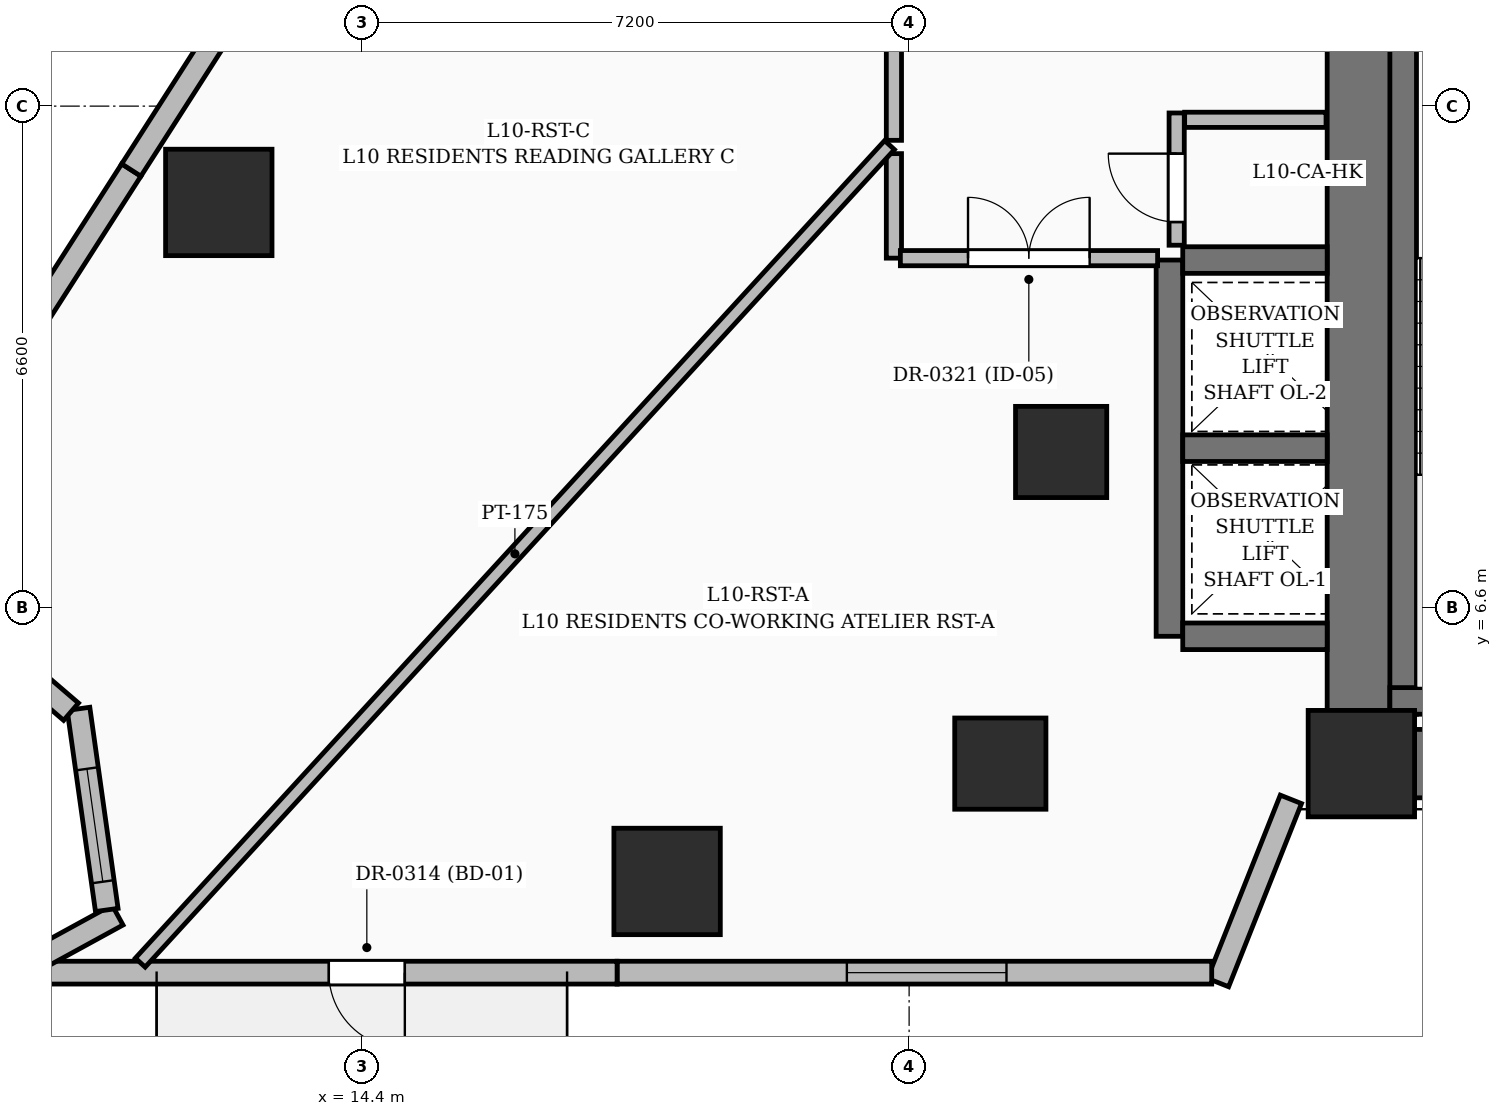
"""IFC4 building model, lengths in metres.
Left out: names, types, materials, properties, quantities, classifications, styles, units other than length and angle.
Written with IfcOpenShell. Run it as: python <this file> out.ifc"""

import sys

from ifc_helpers import new_model, si_unit, direction, frame, frame_2d, origin, origin_2d, place, context, subcontext, project, spatial, rectangle, extrude, element, fill, save


model = new_model("IFC4")
c1 = context("Model", 3, precision=1e-05, world=origin(), true_north=direction((0.0, 1.0)))
c2 = subcontext(c1, "Body", "Model", "MODEL_VIEW")
j1 = project(units=[si_unit("LENGTHUNIT", "METRE"), si_unit("PLANEANGLEUNIT", "RADIAN")], contexts=[c1])
p1 = place(None, origin())
s1 = spatial("IfcSite", under=j1, at=p1, CompositionType="ELEMENT")
p2 = place(p1, origin())
s2 = spatial("IfcBuilding", under=s1, at=p2, CompositionType="ELEMENT")
p3 = place(p2, frame((0.0, 0.0, 46.2)))
s3 = spatial("IfcBuildingStorey", under=s2, at=p3, CompositionType="ELEMENT", Elevation=46.2)
p4 = place(p3, frame((27.55, 4.55, 0.0), z_axis=(0.0, 0.0, 1.0), x_axis=(1.0, 0.0, 0.0)))
e1 = element("IfcColumn", 1, at=p4, inside=s3, PredefinedType="COLUMN", context=c2, shape_type="SweptSolid", body=[
    extrude(rectangle(XDim=1.4, YDim=1.4, at=origin_2d()), origin(), (0.0, 0.0, 1.0), 3.6),
])
for number, where, z_axis, x_axis in (
    (2, (22.8, 4.55, 0.0), (0.0, 0.0, 1.0), (1.0, 0.0, 0.0)),
    (3, (23.6, 8.65, 0.0), (0.0, 0.0, 1.0), (1.0, 0.0, 0.0)),
):
    element("IfcColumn", number, at=place(p3, frame(where, z_axis=z_axis, x_axis=x_axis)), inside=s3, PredefinedType="COLUMN", context=c2, shape_type="SweptSolid", body=[
        extrude(rectangle(XDim=1.2, YDim=1.2, at=origin_2d()), origin(), (0.0, 0.0, 1.0), 3.6),
    ])
p5 = place(p3, frame((28.25, 4.55, 0.0), z_axis=(0.0, 0.0, 1.0), x_axis=(1.0, 0.0, 0.0)))
e4 = element("IfcWall", 4, at=p5, inside=s3, PredefinedType="SHEAR", context=c2, shape_type="SweptSolid", body=[
    extrude(rectangle(XDim=6.2, YDim=0.9, at=frame_2d((3.1, 0.0))), origin(), (0.0, 0.0, 1.0), 3.6),
])
p6 = place(p3, frame((27.55, 5.25, 0.0), z_axis=(0.0, 0.0, 1.0), x_axis=(0.0, 1.0, 0.0)))
e5 = element("IfcWall", 5, at=p6, inside=s3, PredefinedType="SHEAR", context=c2, shape_type="SweptSolid", body=[
    extrude(rectangle(XDim=8.8, YDim=0.9, at=frame_2d((4.4, 0.0))), origin(), (0.0, 0.0, 1.0), 3.6),
])
p7 = place(p3, frame((28.1, 5.2, 0.0), z_axis=(0.0, 0.0, 1.0), x_axis=(0.0, 1.0, 0.0)))
e6 = element("IfcWall", 6, at=p7, inside=s3, PredefinedType="SOLIDWALL", context=c2, shape_type="SweptSolid", body=[
    extrude(rectangle(XDim=9.1, YDim=0.35, at=frame_2d((4.55, 0.0))), origin(), (0.0, 0.0, 1.0), 3.6),
])
p8 = place(p3, frame((27.925, 5.375, 0.0), z_axis=(0.0, 0.0, 1.0), x_axis=(1.0, 0.0, 0.0)))
e7 = element("IfcWall", 7, at=p8, inside=s3, PredefinedType="SOLIDWALL", context=c2, shape_type="SweptSolid", body=[
    extrude(rectangle(XDim=3.55, YDim=0.35, at=frame_2d((1.775, 0.0))), origin(), (0.0, 0.0, 1.0), 3.6),
])
p9 = place(p3, frame((25.025, 6.225, 0.0), z_axis=(0.0, 0.0, 1.0), x_axis=(0.0, 1.0, 0.0)))
e8 = element("IfcWall", 8, at=p9, inside=s3, PredefinedType="SOLIDWALL", context=c2, shape_type="SweptSolid", body=[
    extrude(rectangle(XDim=4.95, YDim=0.35, at=frame_2d((2.475, 0.0))), origin(), (0.0, 0.0, 1.0), 3.6),
])
for number, where, z_axis, x_axis in (
    (9, (25.2, 6.225, 0.0), (0.0, 0.0, 1.0), (1.0, 0.0, 0.0)),
    (10, (25.2, 8.7, 0.0), (0.0, 0.0, 1.0), (1.0, 0.0, 0.0)),
    (11, (25.2, 11.175, 0.0), (0.0, 0.0, 1.0), (1.0, 0.0, 0.0)),
):
    element("IfcWall", number, at=place(p3, frame(where, z_axis=z_axis, x_axis=x_axis)), inside=s3, PredefinedType="SOLIDWALL", context=c2, shape_type="SweptSolid", body=[
        extrude(rectangle(XDim=1.9, YDim=0.35, at=frame_2d((0.95, 0.0))), origin(), (0.0, 0.0, 1.0), 3.6),
    ])
for number, where, z_axis, x_axis in (
    (12, (18.416, 3.0, 0.0), (0.0, 0.0, 1.0), (1.0, 0.0, 0.0)),
    (13, (12.518, 11.933, 0.0), (0.0, 0.0, 1.0), (1.0, 0.0, 0.0)),
):
    element("IfcColumn", number, at=place(p3, frame(where, z_axis=z_axis, x_axis=x_axis)), inside=s3, PredefinedType="COLUMN", context=c2, shape_type="SweptSolid", body=[
        extrude(rectangle(XDim=1.4, YDim=1.4, at=origin_2d()), origin(), (0.0, 0.0, 1.0), 3.6),
    ])
p10 = place(p3, frame((26.623, 4.08, 0.0), z_axis=(0.0, 0.0, 1.0), x_axis=(-0.369539870332, -0.929214875169, 0.0)))
e14 = element("IfcWall", 14, at=p10, inside=s3, PredefinedType="SOLIDWALL", context=c2, shape_type="SweptSolid", body=[
    extrude(rectangle(XDim=2.594, YDim=0.3, at=frame_2d((1.297, 0.0))), origin(), (0.0, 0.0, 1.0), 2.375),
])
p11 = place(p3, frame((25.581, 1.8, 0.0), z_axis=(0.0, 0.0, 1.0), x_axis=(-1.0, 0.0, 0.0)))
e15 = element("IfcWall", 15, at=p11, inside=s3, PredefinedType="SOLIDWALL", context=c2, shape_type="SweptSolid", body=[
    extrude(rectangle(XDim=7.823, YDim=0.3, at=frame_2d((3.912, 0.0))), origin(), (0.0, 0.0, 1.0), 3.35),
])
p12 = place(p11, frame((2.7, 0.0, 0.55)))
e16 = element("IfcOpeningElement", 16, at=p12, cuts=e15, PredefinedType="OPENING", context=c2, shape_type="SweptSolid", body=[
    extrude(rectangle(XDim=2.1, YDim=2.4, at=frame_2d((1.05, 1.2))), frame((0.0, 0.16, 0.0), z_axis=(0.0, -1.0, 0.0), x_axis=(1.0, 0.0, 0.0)), (0.0, 0.0, 1.0), 0.32),
])
p13 = place(p3, frame((17.758, 1.8, 0.0), z_axis=(0.0, 0.0, 1.0), x_axis=(-1.0, 0.0, 0.0)))
e17 = element("IfcWall", 17, at=p13, inside=s3, PredefinedType="SOLIDWALL", context=c2, shape_type="SweptSolid", body=[
    extrude(rectangle(XDim=8.098, YDim=0.3, at=frame_2d((4.049, 0.0))), origin(), (0.0, 0.0, 1.0), 3.35),
])
p14 = place(p13, frame((2.792, 0.0, 0.0)))
e18 = element("IfcOpeningElement", 18, at=p14, cuts=e17, PredefinedType="OPENING", context=c2, shape_type="SweptSolid", body=[
    extrude(rectangle(XDim=1.0, YDim=2.2, at=frame_2d((0.5, 1.1))), frame((0.0, 0.16, 0.0), z_axis=(0.0, -1.0, 0.0), x_axis=(1.0, 0.0, 0.0)), (0.0, 0.0, 1.0), 0.32),
])
p15 = place(p3, frame((10.221, 2.031, 0.0), z_axis=(0.0, 0.0, 1.0), x_axis=(0.877343386297, 0.479863087266, 0.0)))
e19 = element("IfcWall", 19, at=p15, inside=s3, PredefinedType="SOLIDWALL", context=c2, shape_type="SweptSolid", body=[
    extrude(rectangle(XDim=1.099, YDim=0.3, at=frame_2d((0.55, 0.0))), origin(), (0.0, 0.0, 1.0), 3.35),
])
p16 = place(p3, frame((11.044, 2.625, 0.0), z_axis=(0.0, 0.0, 1.0), x_axis=(-0.139079814349, 0.990281174839, 0.0)))
e20 = element("IfcWall", 20, at=p16, inside=s3, PredefinedType="SOLIDWALL", context=c2, shape_type="SweptSolid", body=[
    extrude(rectangle(XDim=2.672, YDim=0.3, at=frame_2d((1.336, 0.0))), origin(), (0.0, 0.0, 1.0), 3.35),
])
p17 = place(p16, frame((0.375, 0.0, 0.6)))
e21 = element("IfcOpeningElement", 21, at=p17, cuts=e20, PredefinedType="OPENING", context=c2, shape_type="SweptSolid", body=[
    extrude(rectangle(XDim=1.5, YDim=2.1, at=frame_2d((0.75, 1.05))), frame((0.0, 0.16, 0.0), z_axis=(0.0, -1.0, 0.0), x_axis=(1.0, 0.0, 0.0)), (0.0, 0.0, 1.0), 0.32),
])
p18 = place(p3, frame((10.574, 5.233, 0.0), z_axis=(0.0, 0.0, 1.0), x_axis=(-0.758703874518, 0.651435668958, 0.0)))
e22 = element("IfcWall", 22, at=p18, inside=s3, PredefinedType="SOLIDWALL", context=c2, shape_type="SweptSolid", body=[
    extrude(rectangle(XDim=2.652, YDim=0.3, at=frame_2d((1.326, 0.0))), origin(), (0.0, 0.0, 1.0), 3.35),
])
p19 = place(p18, frame((0.505, 0.0, 0.8)))
e23 = element("IfcOpeningElement", 23, at=p19, cuts=e22, PredefinedType="OPENING", context=c2, shape_type="SweptSolid", body=[
    extrude(rectangle(XDim=1.2, YDim=1.8, at=frame_2d((0.6, 0.9))), frame((0.0, 0.16, 0.0), z_axis=(0.0, -1.0, 0.0), x_axis=(1.0, 0.0, 0.0)), (0.0, 0.0, 1.0), 0.32),
])
p20 = place(p3, frame((7.66, 6.574, 0.0), z_axis=(0.0, 0.0, 1.0), x_axis=(0.539514369137, 0.84197639248, 0.0)))
e24 = element("IfcWall", 24, at=p20, inside=s3, PredefinedType="SOLIDWALL", context=c2, shape_type="SweptSolid", body=[
    extrude(rectangle(XDim=6.872, YDim=0.3, at=frame_2d((3.436, 0.0))), origin(), (0.0, 0.0, 1.0), 3.35),
])
p21 = place(p20, frame((2.615, 0.0, 0.55)))
e25 = element("IfcOpeningElement", 25, at=p21, cuts=e24, PredefinedType="OPENING", context=c2, shape_type="SweptSolid", body=[
    extrude(rectangle(XDim=2.1, YDim=2.4, at=frame_2d((1.05, 1.2))), frame((0.0, 0.16, 0.0), z_axis=(0.0, -1.0, 0.0), x_axis=(1.0, 0.0, 0.0)), (0.0, 0.0, 1.0), 0.32),
])
p22 = place(p3, frame((11.367, 12.359, 0.0), z_axis=(0.0, 0.0, 1.0), x_axis=(0.539548093607, 0.841954781853, 0.0)))
e26 = element("IfcWall", 26, at=p22, inside=s3, PredefinedType="SOLIDWALL", context=c2, shape_type="SweptSolid", body=[
    extrude(rectangle(XDim=7.481, YDim=0.3, at=frame_2d((3.741, 0.0))), origin(), (0.0, 0.0, 1.0), 3.35),
])
p23 = place(p22, frame((4.449, 0.0, 0.0)))
e27 = element("IfcOpeningElement", 27, at=p23, cuts=e26, PredefinedType="OPENING", context=c2, shape_type="SweptSolid", body=[
    extrude(rectangle(XDim=1.0, YDim=2.2, at=frame_2d((0.5, 1.1))), frame((0.0, 0.16, 0.0), z_axis=(0.0, -1.0, 0.0), x_axis=(1.0, 0.0, 0.0)), (0.0, 0.0, 1.0), 0.32),
])
p24 = place(p3, frame((25.12, 11.37, 0.0), z_axis=(0.0, 0.0, 1.0), x_axis=(0.0, 1.0, 0.0)))
e28 = element("IfcWall", 28, at=p24, inside=s3, PredefinedType="PARTITIONING", context=c2, shape_type="SweptSolid", body=[
    extrude(rectangle(XDim=1.74, YDim=0.2, at=frame_2d((0.87, 0.0))), origin(), (0.0, 0.0, 1.0), 3.35),
])
p25 = place(p24, frame((0.305, 0.0, 0.0)))
e29 = element("IfcOpeningElement", 29, at=p25, cuts=e28, PredefinedType="OPENING", context=c2, shape_type="SweptSolid", body=[
    extrude(rectangle(XDim=0.9, YDim=2.1, at=frame_2d((0.45, 1.05))), frame((0.0, 0.11, 0.0), z_axis=(0.0, -1.0, 0.0), x_axis=(1.0, 0.0, 0.0)), (0.0, 0.0, 1.0), 0.22),
])
p26 = place(p3, frame((25.225, 13.02, 0.0), z_axis=(0.0, 0.0, 1.0), x_axis=(1.0, 0.0, 0.0)))
e30 = element("IfcWall", 30, at=p26, inside=s3, PredefinedType="PARTITIONING", context=c2, shape_type="SweptSolid", body=[
    extrude(rectangle(XDim=1.86, YDim=0.2, at=frame_2d((0.93, 0.0))), origin(), (0.0, 0.0, 1.0), 3.35),
])
p27 = place(p3, frame((21.4, 12.575, 0.0), z_axis=(0.0, 0.0, 1.0), x_axis=(0.0, -1.0, 0.0)))
e31 = element("IfcWall", 31, at=p27, inside=s3, PredefinedType="PARTITIONING", context=c2, shape_type="SweptSolid", body=[
    extrude(rectangle(XDim=1.375, YDim=0.2, at=frame_2d((0.688, 0.0))), origin(), (0.0, 0.0, 1.0), 3.35),
])
p28 = place(p3, frame((21.485, 11.2, 0.0), z_axis=(0.0, 0.0, 1.0), x_axis=(1.0, 0.0, 0.0)))
e32 = element("IfcWall", 32, at=p28, inside=s3, PredefinedType="PARTITIONING", context=c2, shape_type="SweptSolid", body=[
    extrude(rectangle(XDim=3.384, YDim=0.2, at=frame_2d((1.692, 0.0))), origin(), (0.0, 0.0, 1.0), 2.86),
])
p29 = place(p28, frame((0.89, 0.0, 0.0)))
e33 = element("IfcOpeningElement", 33, at=p29, cuts=e32, PredefinedType="OPENING", context=c2, shape_type="SweptSolid", body=[
    extrude(rectangle(XDim=1.6, YDim=2.3, at=frame_2d((0.8, 1.15))), frame((0.0, 0.11, 0.0), z_axis=(0.0, -1.0, 0.0), x_axis=(1.0, 0.0, 0.0)), (0.0, 0.0, 1.0), 0.22),
])
p30 = place(p3, frame((21.4, 17.75, 0.0), z_axis=(0.0, 0.0, 1.0), x_axis=(0.0, -1.0, 0.0)))
e34 = element("IfcWall", 34, at=p30, inside=s3, PredefinedType="PARTITIONING", context=c2, shape_type="SweptSolid", body=[
    extrude(rectangle(XDim=5.0, YDim=0.2, at=frame_2d((2.5, 0.0))), origin(), (0.0, 0.0, 1.0), 2.86),
])
p31 = place(p30, frame((1.642, 0.0, 0.0)))
e35 = element("IfcOpeningElement", 35, at=p31, cuts=e34, PredefinedType="OPENING", context=c2, shape_type="SweptSolid", body=[
    extrude(rectangle(XDim=1.6, YDim=2.3, at=frame_2d((0.8, 1.15))), frame((0.0, 0.11, 0.0), z_axis=(0.0, -1.0, 0.0), x_axis=(1.0, 0.0, 0.0)), (0.0, 0.0, 1.0), 0.22),
])
p32 = place(p3, frame((21.342, 12.688, 0.0), z_axis=(0.0, 0.0, 1.0), x_axis=(-0.675645057992, -0.737227071947, 0.0)))
e36 = element("IfcWall", 36, at=p32, inside=s3, PredefinedType="PARTITIONING", context=c2, shape_type="SweptSolid", body=[
    extrude(rectangle(XDim=14.589, YDim=0.175, at=frame_2d((7.295, 0.0))), origin(), (0.0, 0.0, 1.0), 2.279),
])
p33 = place(p12, origin())
e37 = element("IfcWindow", 37, at=p33, inside=s3, PartitioningType="SINGLE_PANEL", PredefinedType="WINDOW", context=c2, shape_type="SweptSolid", body=[
    extrude(rectangle(XDim=2.1, YDim=2.4, at=frame_2d((1.05, 1.2))), frame((0.0, 0.03, 0.0), z_axis=(0.0, -1.0, 0.0), x_axis=(1.0, 0.0, 0.0)), (0.0, 0.0, 1.0), 0.06),
])
fill(e16, e37)
p34 = place(p14, origin())
e38 = element("IfcDoor", 38, at=p34, inside=s3, OperationType="SINGLE_SWING_LEFT", PredefinedType="DOOR", context=c2, shape_type="SweptSolid", body=[
    extrude(rectangle(XDim=1.0, YDim=2.2, at=frame_2d((0.5, 1.1))), frame((0.0, 0.025, 0.0), z_axis=(0.0, -1.0, 0.0), x_axis=(1.0, 0.0, 0.0)), (0.0, 0.0, 1.0), 0.05),
])
fill(e18, e38)
p35 = place(p17, origin())
e39 = element("IfcWindow", 39, at=p35, inside=s3, PartitioningType="SINGLE_PANEL", PredefinedType="WINDOW", context=c2, shape_type="SweptSolid", body=[
    extrude(rectangle(XDim=1.5, YDim=2.1, at=frame_2d((0.75, 1.05))), frame((0.0, 0.03, 0.0), z_axis=(0.0, -1.0, 0.0), x_axis=(1.0, 0.0, 0.0)), (0.0, 0.0, 1.0), 0.06),
])
fill(e21, e39)
p36 = place(p25, origin())
e40 = element("IfcDoor", 40, at=p36, inside=s3, OperationType="SINGLE_SWING_RIGHT", PredefinedType="DOOR", context=c2, shape_type="SweptSolid", body=[
    extrude(rectangle(XDim=0.9, YDim=2.1, at=frame_2d((0.45, 1.05))), frame((0.0, 0.025, 0.0), z_axis=(0.0, -1.0, 0.0), x_axis=(1.0, 0.0, 0.0)), (0.0, 0.0, 1.0), 0.05),
])
fill(e29, e40)
p37 = place(p29, origin())
e41 = element("IfcDoor", 41, at=p37, inside=s3, OperationType="DOUBLE_DOOR_SINGLE_SWING", PredefinedType="DOOR", context=c2, shape_type="SweptSolid", body=[
    extrude(rectangle(XDim=1.6, YDim=2.3, at=frame_2d((0.8, 1.15))), frame((0.0, 0.025, 0.0), z_axis=(0.0, -1.0, 0.0), x_axis=(1.0, 0.0, 0.0)), (0.0, 0.0, 1.0), 0.05),
])
fill(e33, e41)
save(model, sys.argv[1])
